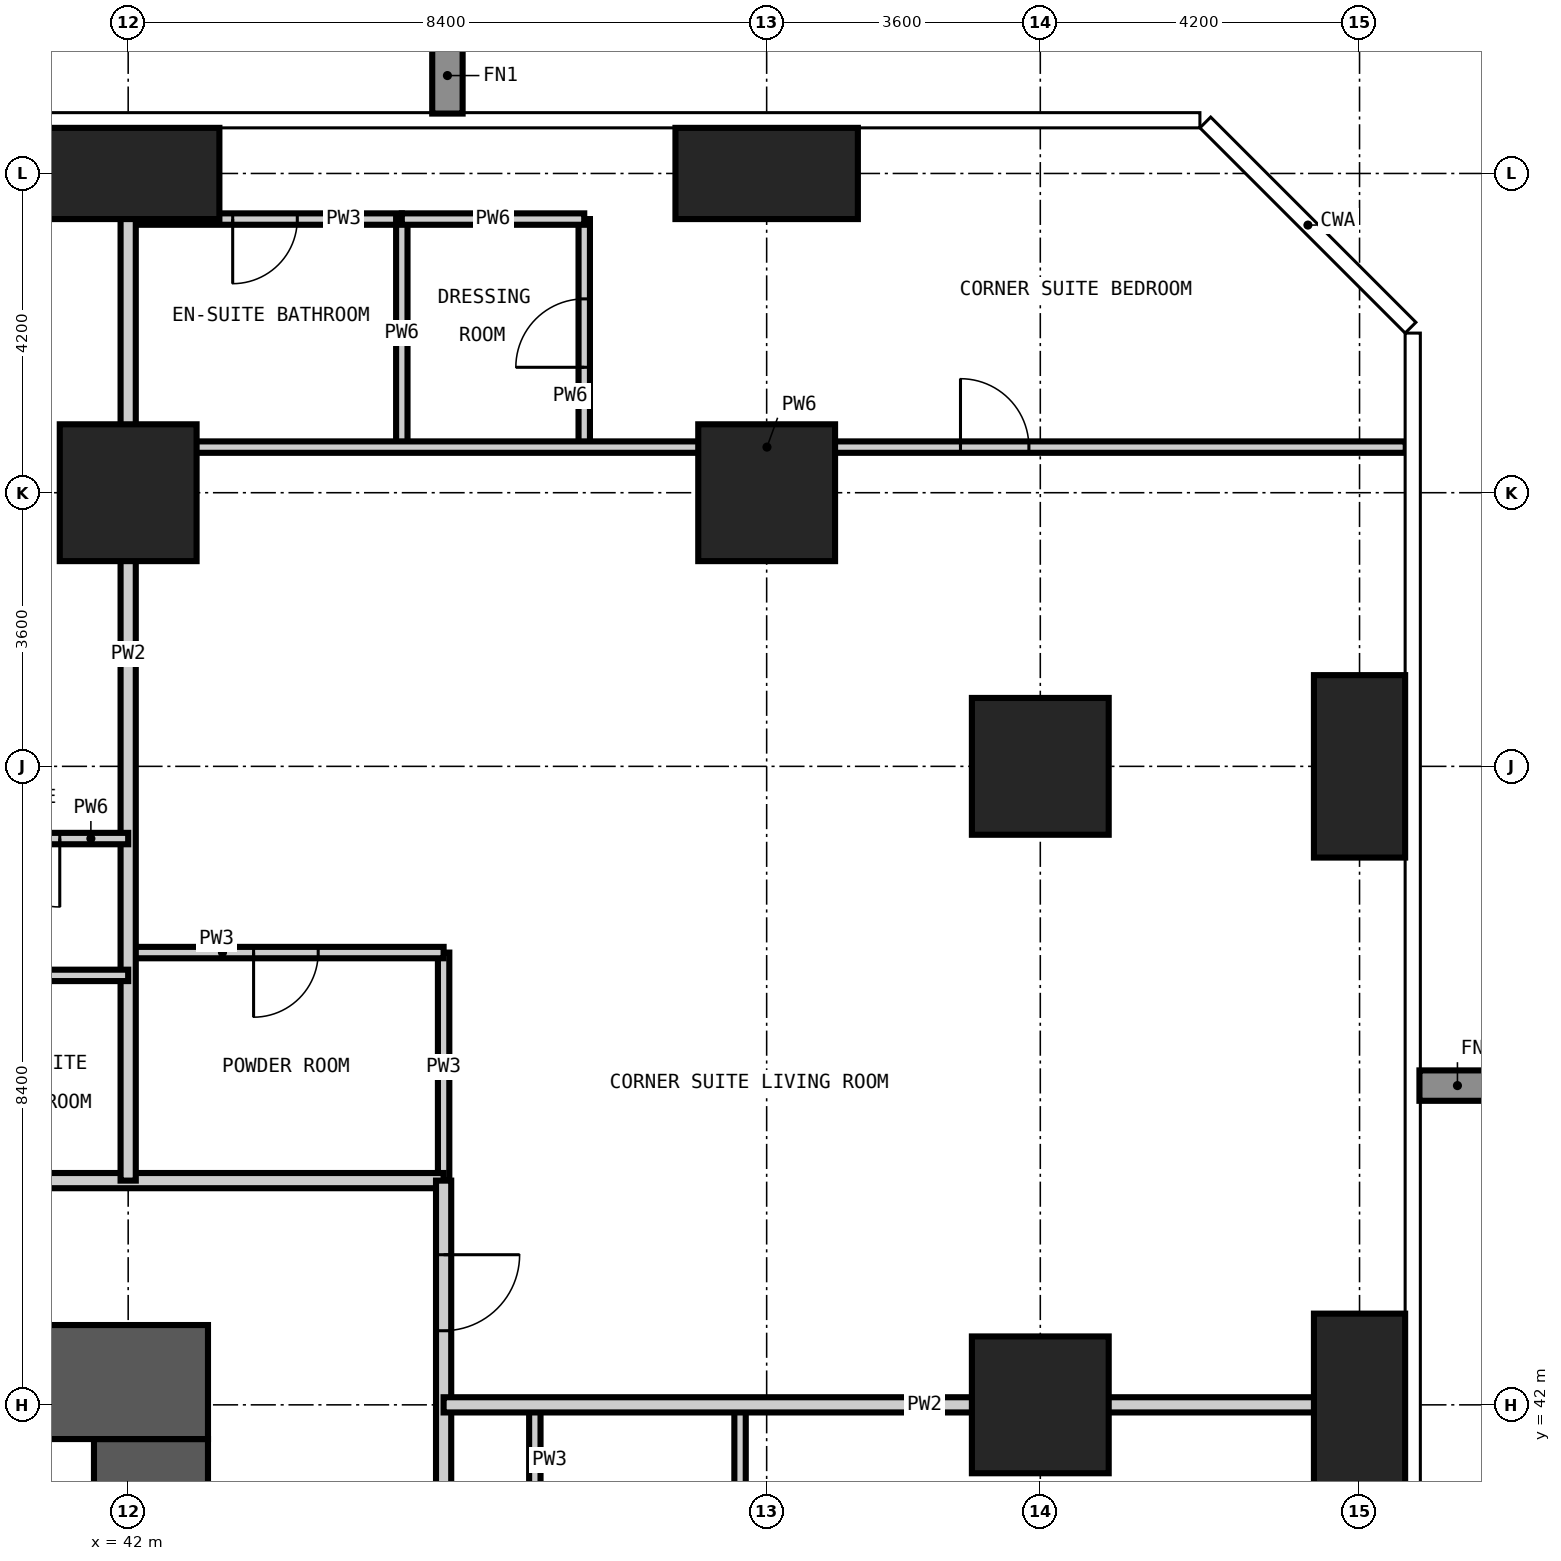
"""IFC4 building model, lengths in metres.
Left out: names, types, materials, properties, quantities, classifications, styles, units other than length and angle.
Written with IfcOpenShell. Run it as: python <this file> out.ifc"""

import sys

from ifc_helpers import new_model, si_unit, direction, frame, frame_2d, origin, origin_2d, place, context, subcontext, project, spatial, rectangle, extrude, element, fill, save


model = new_model("IFC4")
c1 = context("Model", 3, precision=1e-05, world=origin(), true_north=direction((0.0, 1.0)))
c2 = subcontext(c1, "Body", "Model", "MODEL_VIEW")
j1 = project(units=[si_unit("LENGTHUNIT", "METRE"), si_unit("PLANEANGLEUNIT", "RADIAN")], contexts=[c1])
p1 = place(None, origin())
s1 = spatial("IfcSite", under=j1, at=p1, CompositionType="ELEMENT")
p2 = place(p1, origin())
s2 = spatial("IfcBuilding", under=s1, at=p2, CompositionType="ELEMENT")
p3 = place(p2, frame((0.0, 0.0, 63.0)))
s3 = spatial("IfcBuildingStorey", under=s2, at=p3, CompositionType="ELEMENT", Elevation=63.0)
p4 = place(p3, frame((42.0, 54.0, -0.35), z_axis=(0.0, 0.0, 1.0), x_axis=(1.0, 0.0, 0.0)))
e1 = element("IfcColumn", 1, at=p4, inside=s3, PredefinedType="COLUMN", context=c2, shape_type="SweptSolid", body=[
    extrude(rectangle(XDim=1.8, YDim=1.8, at=origin_2d()), origin(), (0.0, 0.0, 1.0), 3.6),
])
p5 = place(p3, frame((42.0, 58.2, -0.35), z_axis=(0.0, 0.0, 1.0), x_axis=(1.0, 0.0, 0.0)))
e2 = element("IfcColumn", 2, at=p5, inside=s3, PredefinedType="COLUMN", context=c2, shape_type="SweptSolid", body=[
    extrude(rectangle(XDim=2.4, YDim=1.2, at=origin_2d()), origin(), (0.0, 0.0, 1.0), 3.6),
])
p6 = place(p3, frame((50.4, 54.0, -0.35), z_axis=(0.0, 0.0, 1.0), x_axis=(1.0, 0.0, 0.0)))
e3 = element("IfcColumn", 3, at=p6, inside=s3, PredefinedType="COLUMN", context=c2, shape_type="SweptSolid", body=[
    extrude(rectangle(XDim=1.8, YDim=1.8, at=origin_2d()), origin(), (0.0, 0.0, 1.0), 3.6),
])
p7 = place(p3, frame((50.4, 58.2, -0.35), z_axis=(0.0, 0.0, 1.0), x_axis=(1.0, 0.0, 0.0)))
e4 = element("IfcColumn", 4, at=p7, inside=s3, PredefinedType="COLUMN", context=c2, shape_type="SweptSolid", body=[
    extrude(rectangle(XDim=2.4, YDim=1.2, at=origin_2d()), origin(), (0.0, 0.0, 1.0), 3.6),
])
for number, where, z_axis, x_axis in (
    (5, (54.0, 42.0, -0.35), (0.0, 0.0, 1.0), (1.0, 0.0, 0.0)),
    (6, (54.0, 50.4, -0.35), (0.0, 0.0, 1.0), (1.0, 0.0, 0.0)),
):
    element("IfcColumn", number, at=place(p3, frame(where, z_axis=z_axis, x_axis=x_axis)), inside=s3, PredefinedType="COLUMN", context=c2, shape_type="SweptSolid", body=[
        extrude(rectangle(XDim=1.8, YDim=1.8, at=origin_2d()), origin(), (0.0, 0.0, 1.0), 3.6),
    ])
for number, where, z_axis, x_axis in (
    (7, (58.2, 42.0, -0.35), (0.0, 0.0, 1.0), (1.0, 0.0, 0.0)),
    (8, (58.2, 50.4, -0.35), (0.0, 0.0, 1.0), (1.0, 0.0, 0.0)),
):
    element("IfcColumn", number, at=place(p3, frame(where, z_axis=z_axis, x_axis=x_axis)), inside=s3, PredefinedType="COLUMN", context=c2, shape_type="SweptSolid", body=[
        extrude(rectangle(XDim=1.2, YDim=2.4, at=origin_2d()), origin(), (0.0, 0.0, 1.0), 3.6),
    ])
p8 = place(p3, frame((42.3, 17.25, -0.35), z_axis=(0.0, 0.0, 1.0), x_axis=(0.0, 1.0, 0.0)))
e9 = element("IfcWall", 9, at=p8, inside=s3, PredefinedType="SHEAR", context=c2, shape_type="SweptSolid", body=[
    extrude(rectangle(XDim=24.3, YDim=1.5, at=frame_2d((12.15, 0.0))), origin(), (0.0, 0.0, 1.0), 3.6),
])
p9 = place(p8, frame((0.35, 0.0, 0.35)))
e10 = element("IfcOpeningElement", 10, at=p9, cuts=e9, PredefinedType="OPENING", context=c2, shape_type="SweptSolid", body=[
    extrude(rectangle(XDim=1.2, YDim=2.2, at=frame_2d((0.6, 1.1))), frame((0.0, 0.76, 0.0), z_axis=(0.0, -1.0, 0.0), x_axis=(1.0, 0.0, 0.0)), (0.0, 0.0, 1.0), 1.52),
])
p10 = place(p8, frame((11.65, 0.0, 0.35)))
e11 = element("IfcOpeningElement", 11, at=p10, cuts=e9, PredefinedType="OPENING", context=c2, shape_type="SweptSolid", body=[
    extrude(rectangle(XDim=1.0, YDim=2.1, at=frame_2d((0.5, 1.05))), frame((0.0, 0.76, 0.0), z_axis=(0.0, -1.0, 0.0), x_axis=(1.0, 0.0, 0.0)), (0.0, 0.0, 1.0), 1.52),
])
p11 = place(p8, frame((20.05, 0.0, 0.35)))
e12 = element("IfcOpeningElement", 12, at=p11, cuts=e9, PredefinedType="OPENING", context=c2, shape_type="SweptSolid", body=[
    extrude(rectangle(XDim=1.0, YDim=2.1, at=frame_2d((0.5, 1.05))), frame((0.0, 0.76, 0.0), z_axis=(0.0, -1.0, 0.0), x_axis=(1.0, 0.0, 0.0)), (0.0, 0.0, 1.0), 1.52),
])
p12 = place(p3, frame((43.05, 42.3, -0.35), z_axis=(0.0, 0.0, 1.0), x_axis=(-1.0, 0.0, 0.0)))
e13 = element("IfcWall", 13, at=p12, inside=s3, PredefinedType="SHEAR", context=c2, shape_type="SweptSolid", body=[
    extrude(rectangle(XDim=27.3, YDim=1.5, at=frame_2d((13.65, 0.0))), origin(), (0.0, 0.0, 1.0), 3.6),
])
p13 = place(p12, frame((21.55, 0.0, 0.35)))
e14 = element("IfcOpeningElement", 14, at=p13, cuts=e13, PredefinedType="OPENING", context=c2, shape_type="SweptSolid", body=[
    extrude(rectangle(XDim=1.0, YDim=2.1, at=frame_2d((0.5, 1.05))), frame((0.0, 0.76, 0.0), z_axis=(0.0, -1.0, 0.0), x_axis=(1.0, 0.0, 0.0)), (0.0, 0.0, 1.0), 1.52),
])
p14 = place(p12, frame((10.95, 0.0, 0.35)))
e15 = element("IfcOpeningElement", 15, at=p14, cuts=e13, PredefinedType="OPENING", context=c2, shape_type="SweptSolid", body=[
    extrude(rectangle(XDim=1.2, YDim=2.2, at=frame_2d((0.6, 1.1))), frame((0.0, 0.76, 0.0), z_axis=(0.0, -1.0, 0.0), x_axis=(1.0, 0.0, 0.0)), (0.0, 0.0, 1.0), 1.52),
])
p15 = place(p3, frame((46.15, 44.95, 0.0), z_axis=(0.0, 0.0, 1.0), x_axis=(0.0, 1.0, 0.0)))
e16 = element("IfcWall", 16, at=p15, inside=s3, PredefinedType="PARTITIONING", context=c2, shape_type="SweptSolid", body=[
    extrude(rectangle(XDim=3.0, YDim=0.15, at=frame_2d((1.5, 0.0))), origin(), (0.0, 0.0, 1.0), 3.25),
])
p16 = place(p3, frame((47.35, 39.0, 0.0), z_axis=(0.0, 0.0, 1.0), x_axis=(0.0, 1.0, 0.0)))
e17 = element("IfcWall", 17, at=p16, inside=s3, PredefinedType="PARTITIONING", context=c2, shape_type="SweptSolid", body=[
    extrude(rectangle(XDim=3.0, YDim=0.15, at=frame_2d((1.5, 0.0))), origin(), (0.0, 0.0, 1.0), 3.25),
])
p17 = place(p16, frame((1.075, 0.0, 0.0)))
e18 = element("IfcOpeningElement", 18, at=p17, cuts=e17, PredefinedType="OPENING", context=c2, shape_type="SweptSolid", body=[
    extrude(rectangle(XDim=0.85, YDim=2.1, at=frame_2d((0.425, 1.05))), frame((0.0, 0.085, 0.0), z_axis=(0.0, -1.0, 0.0), x_axis=(1.0, 0.0, 0.0)), (0.0, 0.0, 1.0), 0.17),
])
p18 = place(p3, frame((50.05, 39.0, 0.0), z_axis=(0.0, 0.0, 1.0), x_axis=(0.0, 1.0, 0.0)))
e19 = element("IfcWall", 19, at=p18, inside=s3, PredefinedType="PARTITIONING", context=c2, shape_type="SweptSolid", body=[
    extrude(rectangle(XDim=3.0, YDim=0.15, at=frame_2d((1.5, 0.0))), origin(), (0.0, 0.0, 1.0), 3.25),
])
p19 = place(p3, frame((42.0, 47.95, 0.0), z_axis=(0.0, 0.0, 1.0), x_axis=(1.0, 0.0, 0.0)))
e20 = element("IfcWall", 20, at=p19, inside=s3, PredefinedType="PARTITIONING", context=c2, shape_type="SweptSolid", body=[
    extrude(rectangle(XDim=4.15, YDim=0.15, at=frame_2d((2.075, 0.0))), origin(), (0.0, 0.0, 1.0), 3.25),
])
p20 = place(p19, frame((1.65, 0.0, 0.0)))
e21 = element("IfcOpeningElement", 21, at=p20, cuts=e20, PredefinedType="OPENING", context=c2, shape_type="SweptSolid", body=[
    extrude(rectangle(XDim=0.85, YDim=2.1, at=frame_2d((0.425, 1.05))), frame((0.0, 0.085, 0.0), z_axis=(0.0, -1.0, 0.0), x_axis=(1.0, 0.0, 0.0)), (0.0, 0.0, 1.0), 0.17),
])
p21 = place(p3, frame((42.0, 57.6, 0.0), z_axis=(0.0, 0.0, 1.0), x_axis=(1.0, 0.0, 0.0)))
e22 = element("IfcWall", 22, at=p21, inside=s3, PredefinedType="PARTITIONING", context=c2, shape_type="SweptSolid", body=[
    extrude(rectangle(XDim=3.6, YDim=0.15, at=frame_2d((1.8, 0.0))), origin(), (0.0, 0.0, 1.0), 3.25),
])
p22 = place(p21, frame((1.375, 0.0, 0.0)))
e23 = element("IfcOpeningElement", 23, at=p22, cuts=e22, PredefinedType="OPENING", context=c2, shape_type="SweptSolid", body=[
    extrude(rectangle(XDim=0.85, YDim=2.1, at=frame_2d((0.425, 1.05))), frame((0.0, 0.085, 0.0), z_axis=(0.0, -1.0, 0.0), x_axis=(1.0, 0.0, 0.0)), (0.0, 0.0, 1.0), 0.17),
])
p23 = place(p3, frame((13.25, 44.95, 0.0), z_axis=(0.0, 0.0, 1.0), x_axis=(1.0, 0.0, 0.0)))
e24 = element("IfcWall", 24, at=p23, inside=s3, PredefinedType="PARTITIONING", context=c2, shape_type="SweptSolid", body=[
    extrude(rectangle(XDim=32.9, YDim=0.2, at=frame_2d((16.45, 0.0))), origin(), (0.0, 0.0, 1.0), 3.25),
])
p24 = place(p23, frame((6.5, 0.0, 0.0)))
e25 = element("IfcOpeningElement", 25, at=p24, cuts=e24, PredefinedType="OPENING", context=c2, shape_type="SweptSolid", body=[
    extrude(rectangle(XDim=1.0, YDim=2.2, at=frame_2d((0.5, 1.1))), frame((0.0, 0.11, 0.0), z_axis=(0.0, -1.0, 0.0), x_axis=(1.0, 0.0, 0.0)), (0.0, 0.0, 1.0), 0.22),
])
p25 = place(p23, frame((8.0, 0.0, 0.0)))
e26 = element("IfcOpeningElement", 26, at=p25, cuts=e24, PredefinedType="OPENING", context=c2, shape_type="SweptSolid", body=[
    extrude(rectangle(XDim=1.0, YDim=2.2, at=frame_2d((0.5, 1.1))), frame((0.0, 0.11, 0.0), z_axis=(0.0, -1.0, 0.0), x_axis=(1.0, 0.0, 0.0)), (0.0, 0.0, 1.0), 0.22),
])
p26 = place(p23, frame((14.9, 0.0, 0.0)))
e27 = element("IfcOpeningElement", 27, at=p26, cuts=e24, PredefinedType="OPENING", context=c2, shape_type="SweptSolid", body=[
    extrude(rectangle(XDim=1.0, YDim=2.2, at=frame_2d((0.5, 1.1))), frame((0.0, 0.11, 0.0), z_axis=(0.0, -1.0, 0.0), x_axis=(1.0, 0.0, 0.0)), (0.0, 0.0, 1.0), 0.22),
])
p27 = place(p23, frame((16.4, 0.0, 0.0)))
e28 = element("IfcOpeningElement", 28, at=p27, cuts=e24, PredefinedType="OPENING", context=c2, shape_type="SweptSolid", body=[
    extrude(rectangle(XDim=1.0, YDim=2.2, at=frame_2d((0.5, 1.1))), frame((0.0, 0.11, 0.0), z_axis=(0.0, -1.0, 0.0), x_axis=(1.0, 0.0, 0.0)), (0.0, 0.0, 1.0), 0.22),
])
p28 = place(p23, frame((23.3, 0.0, 0.0)))
e29 = element("IfcOpeningElement", 29, at=p28, cuts=e24, PredefinedType="OPENING", context=c2, shape_type="SweptSolid", body=[
    extrude(rectangle(XDim=1.0, YDim=2.2, at=frame_2d((0.5, 1.1))), frame((0.0, 0.11, 0.0), z_axis=(0.0, -1.0, 0.0), x_axis=(1.0, 0.0, 0.0)), (0.0, 0.0, 1.0), 0.22),
])
p29 = place(p23, frame((24.8, 0.0, 0.0)))
e30 = element("IfcOpeningElement", 30, at=p29, cuts=e24, PredefinedType="OPENING", context=c2, shape_type="SweptSolid", body=[
    extrude(rectangle(XDim=1.0, YDim=2.2, at=frame_2d((0.5, 1.1))), frame((0.0, 0.11, 0.0), z_axis=(0.0, -1.0, 0.0), x_axis=(1.0, 0.0, 0.0)), (0.0, 0.0, 1.0), 0.22),
])
p30 = place(p3, frame((46.15, 44.95, 0.0), z_axis=(0.0, 0.0, 1.0), x_axis=(0.0, -1.0, 0.0)))
e31 = element("IfcWall", 31, at=p30, inside=s3, PredefinedType="PARTITIONING", context=c2, shape_type="SweptSolid", body=[
    extrude(rectangle(XDim=31.7, YDim=0.2, at=frame_2d((15.85, 0.0))), origin(), (0.0, 0.0, 1.0), 3.25),
])
p31 = place(p30, frame((24.65, 0.0, 0.0)))
e32 = element("IfcOpeningElement", 32, at=p31, cuts=e31, PredefinedType="OPENING", context=c2, shape_type="SweptSolid", body=[
    extrude(rectangle(XDim=1.0, YDim=2.2, at=frame_2d((0.5, 1.1))), frame((0.0, 0.11, 0.0), z_axis=(0.0, -1.0, 0.0), x_axis=(1.0, 0.0, 0.0)), (0.0, 0.0, 1.0), 0.22),
])
p32 = place(p30, frame((13.85, 0.0, 0.0)))
e33 = element("IfcOpeningElement", 33, at=p32, cuts=e31, PredefinedType="OPENING", context=c2, shape_type="SweptSolid", body=[
    extrude(rectangle(XDim=1.0, YDim=2.2, at=frame_2d((0.5, 1.1))), frame((0.0, 0.11, 0.0), z_axis=(0.0, -1.0, 0.0), x_axis=(1.0, 0.0, 0.0)), (0.0, 0.0, 1.0), 0.22),
])
p33 = place(p30, frame((7.85, 0.0, 0.0)))
e34 = element("IfcOpeningElement", 34, at=p33, cuts=e31, PredefinedType="OPENING", context=c2, shape_type="SweptSolid", body=[
    extrude(rectangle(XDim=1.0, YDim=2.2, at=frame_2d((0.5, 1.1))), frame((0.0, 0.11, 0.0), z_axis=(0.0, -1.0, 0.0), x_axis=(1.0, 0.0, 0.0)), (0.0, 0.0, 1.0), 0.22),
])
p34 = place(p30, frame((29.425, 0.0, 0.0)))
e35 = element("IfcOpeningElement", 35, at=p34, cuts=e31, PredefinedType="OPENING", context=c2, shape_type="SweptSolid", body=[
    extrude(rectangle(XDim=1.0, YDim=2.2, at=frame_2d((0.5, 1.1))), frame((0.0, 0.11, 0.0), z_axis=(0.0, -1.0, 0.0), x_axis=(1.0, 0.0, 0.0)), (0.0, 0.0, 1.0), 0.22),
])
p35 = place(p30, frame((0.975, 0.0, 0.0)))
e36 = element("IfcOpeningElement", 36, at=p35, cuts=e31, PredefinedType="OPENING", context=c2, shape_type="SweptSolid", body=[
    extrude(rectangle(XDim=1.0, YDim=2.2, at=frame_2d((0.5, 1.1))), frame((0.0, 0.11, 0.0), z_axis=(0.0, -1.0, 0.0), x_axis=(1.0, 0.0, 0.0)), (0.0, 0.0, 1.0), 0.22),
])
p36 = place(p3, frame((42.0, 44.95, 0.0), z_axis=(0.0, 0.0, 1.0), x_axis=(0.0, 1.0, 0.0)))
e37 = element("IfcWall", 37, at=p36, inside=s3, PredefinedType="PARTITIONING", context=c2, shape_type="SweptSolid", body=[
    extrude(rectangle(XDim=13.858, YDim=0.2, at=frame_2d((6.929, 0.0))), origin(), (0.0, 0.0, 1.0), 3.25),
])
p37 = place(p3, frame((46.15, 42.0, 0.0), z_axis=(0.0, 0.0, 1.0), x_axis=(1.0, 0.0, 0.0)))
e38 = element("IfcWall", 38, at=p37, inside=s3, PredefinedType="PARTITIONING", context=c2, shape_type="SweptSolid", body=[
    extrude(rectangle(XDim=12.658, YDim=0.2, at=frame_2d((6.329, 0.0))), origin(), (0.0, 0.0, 1.0), 3.25),
])
p38 = place(p3, frame((45.6, 54.6, 0.0), z_axis=(0.0, 0.0, 1.0), x_axis=(0.0, 1.0, 0.0)))
e39 = element("IfcWall", 39, at=p38, inside=s3, PredefinedType="PARTITIONING", context=c2, shape_type="SweptSolid", body=[
    extrude(rectangle(XDim=3.0, YDim=0.15, at=frame_2d((1.5, 0.0))), origin(), (0.0, 0.0, 1.0), 3.25),
])
p39 = place(p3, frame((48.0, 54.6, 0.0), z_axis=(0.0, 0.0, 1.0), x_axis=(0.0, 1.0, 0.0)))
e40 = element("IfcWall", 40, at=p39, inside=s3, PredefinedType="PARTITIONING", context=c2, shape_type="SweptSolid", body=[
    extrude(rectangle(XDim=3.0, YDim=0.15, at=frame_2d((1.5, 0.0))), origin(), (0.0, 0.0, 1.0), 3.25),
])
p40 = place(p39, frame((1.05, 0.0, 0.0)))
e41 = element("IfcOpeningElement", 41, at=p40, cuts=e40, PredefinedType="OPENING", context=c2, shape_type="SweptSolid", body=[
    extrude(rectangle(XDim=0.9, YDim=2.1, at=frame_2d((0.45, 1.05))), frame((0.0, 0.085, 0.0), z_axis=(0.0, -1.0, 0.0), x_axis=(1.0, 0.0, 0.0)), (0.0, 0.0, 1.0), 0.17),
])
p41 = place(p3, frame((39.3, 47.65, 0.0), z_axis=(0.0, 0.0, 1.0), x_axis=(1.0, 0.0, 0.0)))
e42 = element("IfcWall", 42, at=p41, inside=s3, PredefinedType="PARTITIONING", context=c2, shape_type="SweptSolid", body=[
    extrude(rectangle(XDim=2.7, YDim=0.15, at=frame_2d((1.35, 0.0))), origin(), (0.0, 0.0, 1.0), 3.25),
])
p42 = place(p3, frame((39.3, 49.45, 0.0), z_axis=(0.0, 0.0, 1.0), x_axis=(1.0, 0.0, 0.0)))
e43 = element("IfcWall", 43, at=p42, inside=s3, PredefinedType="PARTITIONING", context=c2, shape_type="SweptSolid", body=[
    extrude(rectangle(XDim=2.7, YDim=0.15, at=frame_2d((1.35, 0.0))), origin(), (0.0, 0.0, 1.0), 3.25),
])
p43 = place(p42, frame((0.9, 0.0, 0.0)))
e44 = element("IfcOpeningElement", 44, at=p43, cuts=e43, PredefinedType="OPENING", context=c2, shape_type="SweptSolid", body=[
    extrude(rectangle(XDim=0.9, YDim=2.1, at=frame_2d((0.45, 1.05))), frame((0.0, 0.085, 0.0), z_axis=(0.0, -1.0, 0.0), x_axis=(1.0, 0.0, 0.0)), (0.0, 0.0, 1.0), 0.17),
])
p44 = place(p3, frame((42.0, 54.6, 0.0), z_axis=(0.0, 0.0, 1.0), x_axis=(1.0, 0.0, 0.0)))
e45 = element("IfcWall", 45, at=p44, inside=s3, PredefinedType="PARTITIONING", context=c2, shape_type="SweptSolid", body=[
    extrude(rectangle(XDim=16.808, YDim=0.15, at=frame_2d((8.404, 0.0))), origin(), (0.0, 0.0, 1.0), 3.25),
])
p45 = place(p44, frame((10.95, 0.0, 0.0)))
e46 = element("IfcOpeningElement", 46, at=p45, cuts=e45, PredefinedType="OPENING", context=c2, shape_type="SweptSolid", body=[
    extrude(rectangle(XDim=0.9, YDim=2.1, at=frame_2d((0.45, 1.05))), frame((0.0, 0.085, 0.0), z_axis=(0.0, -1.0, 0.0), x_axis=(1.0, 0.0, 0.0)), (0.0, 0.0, 1.0), 0.17),
])
p46 = place(p3, frame((45.6, 57.6, 0.0), z_axis=(0.0, 0.0, 1.0), x_axis=(1.0, 0.0, 0.0)))
e47 = element("IfcWall", 47, at=p46, inside=s3, PredefinedType="PARTITIONING", context=c2, shape_type="SweptSolid", body=[
    extrude(rectangle(XDim=2.4, YDim=0.15, at=frame_2d((1.2, 0.0))), origin(), (0.0, 0.0, 1.0), 3.25),
])
p47 = place(p43, frame((0.9, 0.0, 0.0), z_axis=(0.0, 0.0, 1.0), x_axis=(-1.0, 0.0, 0.0)))
e48 = element("IfcDoor", 48, at=p47, inside=s3, OperationType="SINGLE_SWING_LEFT", PredefinedType="DOOR", context=c2, shape_type="SweptSolid", body=[
    extrude(rectangle(XDim=0.9, YDim=2.1, at=frame_2d((0.45, 1.05))), frame((0.0, 0.025, 0.0), z_axis=(0.0, -1.0, 0.0), x_axis=(1.0, 0.0, 0.0)), (0.0, 0.0, 1.0), 0.05),
])
fill(e44, e48)
p48 = place(p35, origin())
e49 = element("IfcDoor", 49, at=p48, inside=s3, OperationType="SINGLE_SWING_LEFT", PredefinedType="DOOR", context=c2, shape_type="SweptSolid", body=[
    extrude(rectangle(XDim=1.0, YDim=2.2, at=frame_2d((0.5, 1.1))), frame((0.0, 0.025, 0.0), z_axis=(0.0, -1.0, 0.0), x_axis=(1.0, 0.0, 0.0)), (0.0, 0.0, 1.0), 0.05),
])
fill(e36, e49)
p49 = place(p20, frame((0.85, 0.0, 0.0), z_axis=(0.0, 0.0, 1.0), x_axis=(-1.0, 0.0, 0.0)))
e50 = element("IfcDoor", 50, at=p49, inside=s3, OperationType="SINGLE_SWING_RIGHT", PredefinedType="DOOR", context=c2, shape_type="SweptSolid", body=[
    extrude(rectangle(XDim=0.85, YDim=2.1, at=frame_2d((0.425, 1.05))), frame((0.0, 0.025, 0.0), z_axis=(0.0, -1.0, 0.0), x_axis=(1.0, 0.0, 0.0)), (0.0, 0.0, 1.0), 0.05),
])
fill(e21, e50)
p50 = place(p45, origin())
e51 = element("IfcDoor", 51, at=p50, inside=s3, OperationType="SINGLE_SWING_LEFT", PredefinedType="DOOR", context=c2, shape_type="SweptSolid", body=[
    extrude(rectangle(XDim=0.9, YDim=2.1, at=frame_2d((0.45, 1.05))), frame((0.0, 0.025, 0.0), z_axis=(0.0, -1.0, 0.0), x_axis=(1.0, 0.0, 0.0)), (0.0, 0.0, 1.0), 0.05),
])
fill(e46, e51)
p51 = place(p22, frame((0.85, 0.0, 0.0), z_axis=(0.0, 0.0, 1.0), x_axis=(-1.0, 0.0, 0.0)))
e52 = element("IfcDoor", 52, at=p51, inside=s3, OperationType="SINGLE_SWING_RIGHT", PredefinedType="DOOR", context=c2, shape_type="SweptSolid", body=[
    extrude(rectangle(XDim=0.85, YDim=2.1, at=frame_2d((0.425, 1.05))), frame((0.0, 0.025, 0.0), z_axis=(0.0, -1.0, 0.0), x_axis=(1.0, 0.0, 0.0)), (0.0, 0.0, 1.0), 0.05),
])
fill(e23, e52)
p52 = place(p40, origin())
e53 = element("IfcDoor", 53, at=p52, inside=s3, OperationType="SINGLE_SWING_LEFT", PredefinedType="DOOR", context=c2, shape_type="SweptSolid", body=[
    extrude(rectangle(XDim=0.9, YDim=2.1, at=frame_2d((0.45, 1.05))), frame((0.0, 0.025, 0.0), z_axis=(0.0, -1.0, 0.0), x_axis=(1.0, 0.0, 0.0)), (0.0, 0.0, 1.0), 0.05),
])
fill(e41, e53)
save(model, sys.argv[1])
